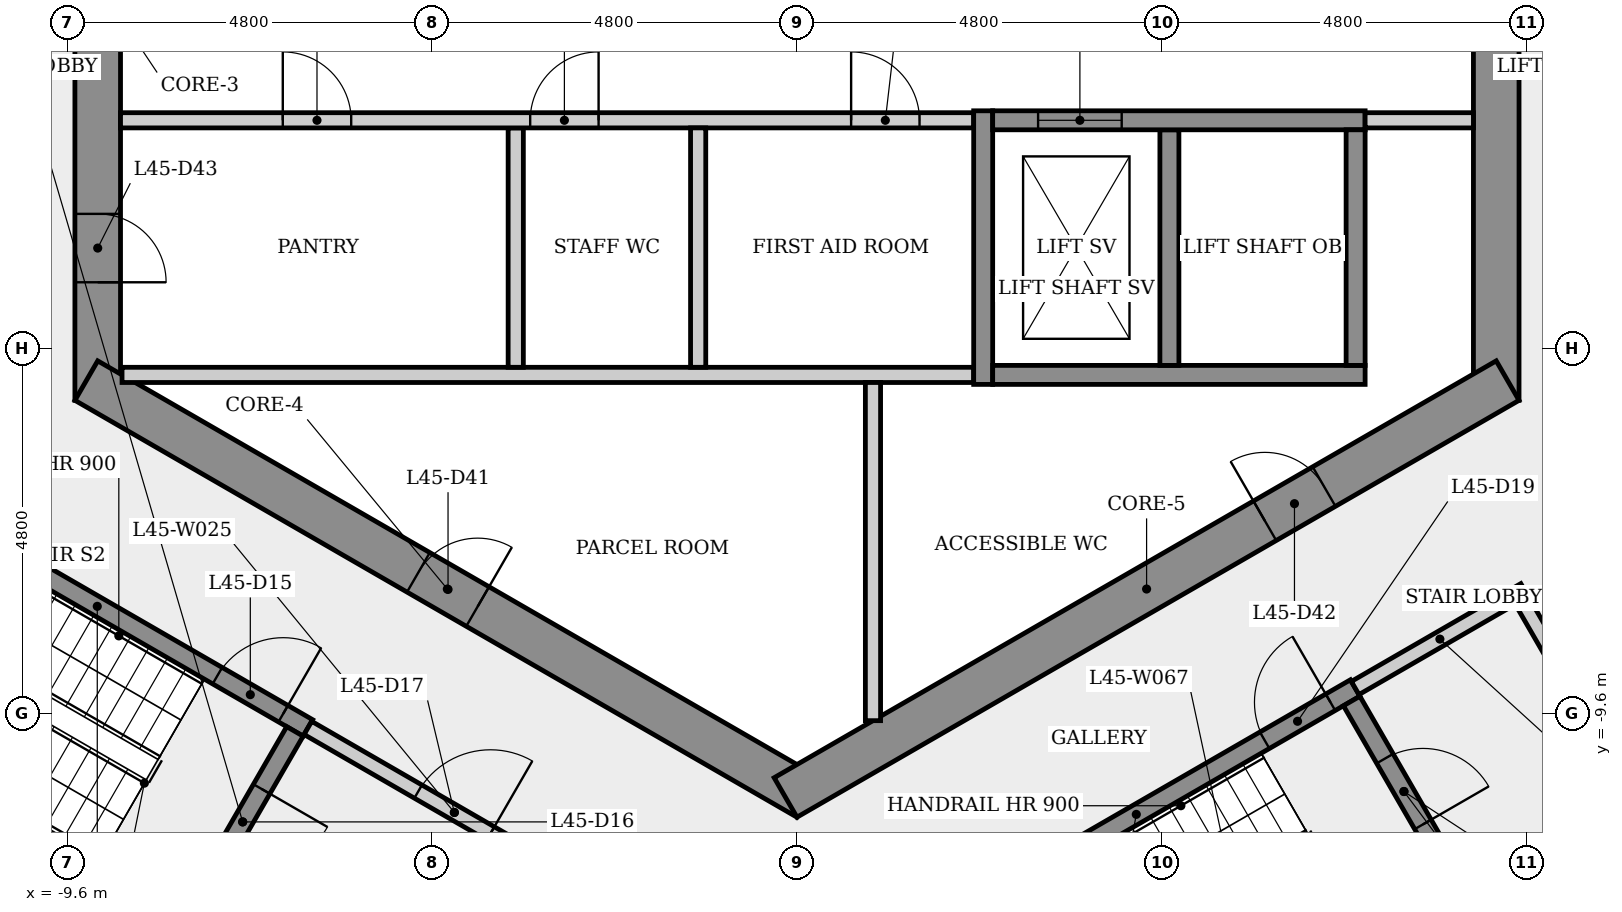
"""IFC4 building model, lengths in metres.
Left out: names, types, materials, properties, quantities, classifications, styles, units other than length and angle.
Written with IfcOpenShell. Run it as: python <this file> out.ifc"""

import sys

from ifc_helpers import new_model, si_unit, direction, frame, frame_2d, origin, place, context, subcontext, project, spatial, rectangle, extrude, element, fill, save


model = new_model("IFC4")
c1 = context("Model", 3, precision=1e-05, world=origin(), true_north=direction((0.0, 1.0)))
c2 = subcontext(c1, "Body", "Model", "MODEL_VIEW")
j1 = project(units=[si_unit("LENGTHUNIT", "METRE"), si_unit("PLANEANGLEUNIT", "RADIAN")], contexts=[c1])
p1 = place(None, origin())
s1 = spatial("IfcSite", under=j1, at=p1, CompositionType="ELEMENT")
p2 = place(p1, origin())
s2 = spatial("IfcBuilding", under=s1, at=p2, CompositionType="ELEMENT")
p3 = place(p2, frame((0.0, 0.0, 169.7)))
s3 = spatial("IfcBuildingStorey", under=s2, at=p3, CompositionType="ELEMENT", Elevation=169.7)
p4 = place(p3, frame((9.2, -5.485, 0.0), z_axis=(0.0, 0.0, 1.0), x_axis=(0.0, 1.0, 0.0)))
e1 = element("IfcWall", 1, at=p4, inside=s3, PredefinedType="SHEAR", context=c2, shape_type="SweptSolid", body=[
    extrude(rectangle(XDim=10.97, YDim=0.6, at=frame_2d((5.485, 0.0))), origin(), (0.0, 0.0, 1.0), 3.4),
])
p5 = place(p4, frame((4.685, 0.0, 0.0)))
e2 = element("IfcOpeningElement", 2, at=p5, cuts=e1, PredefinedType="OPENING", context=c2, shape_type="SweptSolid", body=[
    extrude(rectangle(XDim=1.6, YDim=2.1, at=frame_2d((0.8, 1.05))), frame((0.0, 0.31, 0.0), z_axis=(0.0, -1.0, 0.0), x_axis=(1.0, 0.0, 0.0)), (0.0, 0.0, 1.0), 0.62),
])
p6 = place(p3, frame((-9.2, 5.485, 0.0), z_axis=(0.0, 0.0, 1.0), x_axis=(0.0, -1.0, 0.0)))
e3 = element("IfcWall", 3, at=p6, inside=s3, PredefinedType="SHEAR", context=c2, shape_type="SweptSolid", body=[
    extrude(rectangle(XDim=10.97, YDim=0.6, at=frame_2d((5.485, 0.0))), origin(), (0.0, 0.0, 1.0), 3.4),
])
p7 = place(p6, frame((8.516, 0.0, 0.0)))
e4 = element("IfcOpeningElement", 4, at=p7, cuts=e3, PredefinedType="OPENING", context=c2, shape_type="SweptSolid", body=[
    extrude(rectangle(XDim=0.9, YDim=2.1, at=frame_2d((0.45, 1.05))), frame((0.0, 0.31, 0.0), z_axis=(0.0, -1.0, 0.0), x_axis=(1.0, 0.0, 0.0)), (0.0, 0.0, 1.0), 0.62),
])
p8 = place(p6, frame((4.685, 0.0, 0.0)))
e5 = element("IfcOpeningElement", 5, at=p8, cuts=e3, PredefinedType="OPENING", context=c2, shape_type="SweptSolid", body=[
    extrude(rectangle(XDim=1.6, YDim=2.1, at=frame_2d((0.8, 1.05))), frame((0.0, 0.31, 0.0), z_axis=(0.0, -1.0, 0.0), x_axis=(1.0, 0.0, 0.0)), (0.0, 0.0, 1.0), 0.62),
])
p9 = place(p3, frame((-9.35, -5.225, 0.0), z_axis=(0.0, 0.0, 1.0), x_axis=(0.866023993627, -0.500002442456, 0.0)))
e6 = element("IfcWall", 6, at=p9, inside=s3, PredefinedType="SHEAR", context=c2, shape_type="SweptSolid", body=[
    extrude(rectangle(XDim=10.97, YDim=0.6, at=frame_2d((5.485, 0.0))), origin(), (0.0, 0.0, 1.0), 3.4),
])
p10 = place(p9, frame((5.045, 0.0, 0.0)))
e7 = element("IfcOpeningElement", 7, at=p10, cuts=e6, PredefinedType="OPENING", context=c2, shape_type="SweptSolid", body=[
    extrude(rectangle(XDim=0.9, YDim=2.1, at=frame_2d((0.45, 1.05))), frame((0.0, 0.31, 0.0), z_axis=(0.0, -1.0, 0.0), x_axis=(1.0, 0.0, 0.0)), (0.0, 0.0, 1.0), 0.62),
])
p11 = place(p3, frame((-0.15, -10.71, 0.0), z_axis=(0.0, 0.0, 1.0), x_axis=(0.866023993627, 0.500002442456, 0.0)))
e8 = element("IfcWall", 8, at=p11, inside=s3, PredefinedType="SHEAR", context=c2, shape_type="SweptSolid", body=[
    extrude(rectangle(XDim=10.97, YDim=0.6, at=frame_2d((5.485, 0.0))), origin(), (0.0, 0.0, 1.0), 3.4),
])
p12 = place(p11, frame((7.281, 0.0, 0.0)))
e9 = element("IfcOpeningElement", 9, at=p12, cuts=e8, PredefinedType="OPENING", context=c2, shape_type="SweptSolid", body=[
    extrude(rectangle(XDim=0.9, YDim=2.1, at=frame_2d((0.45, 1.05))), frame((0.0, 0.31, 0.0), z_axis=(0.0, -1.0, 0.0), x_axis=(1.0, 0.0, 0.0)), (0.0, 0.0, 1.0), 0.62),
])
p13 = place(p3, frame((-11.977, -6.595, 0.0), z_axis=(0.0, 0.0, 1.0), x_axis=(0.866025499775, -0.499999833739, 0.0)))
e10 = element("IfcWall", 10, at=p13, inside=s3, PredefinedType="SHEAR", context=c2, shape_type="SweptSolid", body=[
    extrude(rectangle(XDim=6.4, YDim=0.25, at=frame_2d((3.2, 0.0))), origin(), (0.0, 0.0, 1.0), 3.05),
])
p14 = place(p13, frame((5.025, 0.0, 0.0)))
e11 = element("IfcOpeningElement", 11, at=p14, cuts=e10, PredefinedType="OPENING", context=c2, shape_type="SweptSolid", body=[
    extrude(rectangle(XDim=1.0, YDim=2.1, at=frame_2d((0.5, 1.05))), frame((0.0, 0.135, 0.0), z_axis=(0.0, -1.0, 0.0), x_axis=(1.0, 0.0, 0.0)), (0.0, 0.0, 1.0), 0.27),
])
p15 = place(p3, frame((-8.88, -5.15, 0.0), z_axis=(0.0, 0.0, 1.0), x_axis=(1.0, 0.0, 0.0)))
e12 = element("IfcWall", 12, at=p15, inside=s3, PredefinedType="PARTITIONING", context=c2, shape_type="SweptSolid", body=[
    extrude(rectangle(XDim=11.205, YDim=0.2, at=frame_2d((5.603, 0.0))), origin(), (0.0, 0.0, 1.0), 3.05),
])
p16 = place(p3, frame((-7.935, -12.393, 0.0), z_axis=(0.0, 0.0, 1.0), x_axis=(-0.866025499775, 0.499999833739, 0.0)))
e13 = element("IfcWall", 13, at=p16, inside=s3, PredefinedType="SHEAR", context=c2, shape_type="SweptSolid", body=[
    extrude(rectangle(XDim=6.4, YDim=0.25, at=frame_2d((3.2, 0.0))), origin(), (0.0, 0.0, 1.0), 3.05),
])
p17 = place(p3, frame((-6.605, -9.841, 0.0), z_axis=(0.0, 0.0, 1.0), x_axis=(-0.499996545922, -0.866027397988, 0.0)))
e14 = element("IfcWall", 14, at=p17, inside=s3, PredefinedType="SHEAR", context=c2, shape_type="SweptSolid", body=[
    extrude(rectangle(XDim=2.75, YDim=0.25, at=frame_2d((1.375, 0.0))), origin(), (0.0, 0.0, 1.0), 3.05),
])
p18 = place(p17, frame((0.875, 0.0, 0.0)))
e15 = element("IfcOpeningElement", 15, at=p18, cuts=e14, PredefinedType="OPENING", context=c2, shape_type="SweptSolid", body=[
    extrude(rectangle(XDim=1.0, YDim=2.1, at=frame_2d((0.5, 1.05))), frame((0.0, 0.135, 0.0), z_axis=(0.0, -1.0, 0.0), x_axis=(1.0, 0.0, 0.0)), (0.0, 0.0, 1.0), 0.27),
])
p19 = place(p3, frame((-6.435, -9.795, 0.0), z_axis=(0.0, 0.0, 1.0), x_axis=(0.866012907634, -0.500021643343, 0.0)))
e16 = element("IfcWall", 16, at=p19, inside=s3, PredefinedType="PARTITIONING", context=c2, shape_type="SweptSolid", body=[
    extrude(rectangle(XDim=4.45, YDim=0.2, at=frame_2d((2.225, 0.0))), origin(), (0.0, 0.0, 1.0), 3.05),
])
p20 = place(p19, frame((1.675, 0.0, 0.0)))
e17 = element("IfcOpeningElement", 17, at=p20, cuts=e16, PredefinedType="OPENING", context=c2, shape_type="SweptSolid", body=[
    extrude(rectangle(XDim=1.1, YDim=2.1, at=frame_2d((0.55, 1.05))), frame((0.0, 0.11, 0.0), z_axis=(0.0, -1.0, 0.0), x_axis=(1.0, 0.0, 0.0)), (0.0, 0.0, 1.0), 0.22),
])
p21 = place(p3, frame((-3.7, -1.9, 0.0), z_axis=(0.0, 0.0, 1.0), x_axis=(0.0, -1.0, 0.0)))
e18 = element("IfcWall", 18, at=p21, inside=s3, PredefinedType="PARTITIONING", context=c2, shape_type="SweptSolid", body=[
    extrude(rectangle(XDim=3.15, YDim=0.2, at=frame_2d((1.575, 0.0))), origin(), (0.0, 0.0, 1.0), 3.05),
])
p22 = place(p3, frame((-8.9, -1.8, 0.0), z_axis=(0.0, 0.0, 1.0), x_axis=(1.0, 0.0, 0.0)))
e19 = element("IfcWall", 19, at=p22, inside=s3, PredefinedType="PARTITIONING", context=c2, shape_type="SweptSolid", body=[
    extrude(rectangle(XDim=11.225, YDim=0.2, at=frame_2d((5.613, 0.0))), origin(), (0.0, 0.0, 1.0), 3.05),
])
p23 = place(p22, frame((2.135, 0.0, 0.0)))
e20 = element("IfcOpeningElement", 20, at=p23, cuts=e19, PredefinedType="OPENING", context=c2, shape_type="SweptSolid", body=[
    extrude(rectangle(XDim=0.9, YDim=2.1, at=frame_2d((0.45, 1.05))), frame((0.0, 0.11, 0.0), z_axis=(0.0, -1.0, 0.0), x_axis=(1.0, 0.0, 0.0)), (0.0, 0.0, 1.0), 0.22),
])
p24 = place(p22, frame((5.39, 0.0, 0.0)))
e21 = element("IfcOpeningElement", 21, at=p24, cuts=e19, PredefinedType="OPENING", context=c2, shape_type="SweptSolid", body=[
    extrude(rectangle(XDim=0.9, YDim=2.1, at=frame_2d((0.45, 1.05))), frame((0.0, 0.11, 0.0), z_axis=(0.0, -1.0, 0.0), x_axis=(1.0, 0.0, 0.0)), (0.0, 0.0, 1.0), 0.22),
])
p25 = place(p22, frame((9.613, 0.0, 0.0)))
e22 = element("IfcOpeningElement", 22, at=p25, cuts=e19, PredefinedType="OPENING", context=c2, shape_type="SweptSolid", body=[
    extrude(rectangle(XDim=0.9, YDim=2.1, at=frame_2d((0.45, 1.05))), frame((0.0, 0.11, 0.0), z_axis=(0.0, -1.0, 0.0), x_axis=(1.0, 0.0, 0.0)), (0.0, 0.0, 1.0), 0.22),
])
p26 = place(p3, frame((-1.3, -1.9, 0.0), z_axis=(0.0, 0.0, 1.0), x_axis=(0.0, -1.0, 0.0)))
e23 = element("IfcWall", 23, at=p26, inside=s3, PredefinedType="PARTITIONING", context=c2, shape_type="SweptSolid", body=[
    extrude(rectangle(XDim=3.15, YDim=0.2, at=frame_2d((1.575, 0.0))), origin(), (0.0, 0.0, 1.0), 3.05),
])
p27 = place(p3, frame((1.0, -5.25, 0.0), z_axis=(0.0, 0.0, 1.0), x_axis=(0.0, -1.0, 0.0)))
e24 = element("IfcWall", 24, at=p27, inside=s3, PredefinedType="PARTITIONING", context=c2, shape_type="SweptSolid", body=[
    extrude(rectangle(XDim=4.449, YDim=0.2, at=frame_2d((2.225, 0.0))), origin(), (0.0, 0.0, 1.0), 3.05),
])
p28 = place(p3, frame((1.585, -12.595, 0.0), z_axis=(0.0, 0.0, 1.0), x_axis=(0.866036417653, 0.499980922934, 0.0)))
e25 = element("IfcWall", 25, at=p28, inside=s3, PredefinedType="SHEAR", context=c2, shape_type="SweptSolid", body=[
    extrude(rectangle(XDim=6.65, YDim=0.25, at=frame_2d((3.325, 0.0))), origin(), (0.0, 0.0, 1.0), 3.05),
])
p29 = place(p28, frame((5.275, 0.0, 0.0)))
e26 = element("IfcOpeningElement", 26, at=p29, cuts=e25, PredefinedType="OPENING", context=c2, shape_type="SweptSolid", body=[
    extrude(rectangle(XDim=1.0, YDim=2.1, at=frame_2d((0.5, 1.05))), frame((0.0, 0.135, 0.0), z_axis=(0.0, -1.0, 0.0), x_axis=(1.0, 0.0, 0.0)), (0.0, 0.0, 1.0), 0.27),
])
p30 = place(p3, frame((2.45, -5.275, 0.0), z_axis=(0.0, 0.0, 1.0), x_axis=(0.0, 1.0, 0.0)))
e27 = element("IfcWall", 27, at=p30, inside=s3, PredefinedType="SHEAR", context=c2, shape_type="SweptSolid", body=[
    extrude(rectangle(XDim=3.6, YDim=0.25, at=frame_2d((1.8, 0.0))), origin(), (0.0, 0.0, 1.0), 3.05),
])
p31 = place(p3, frame((2.575, -5.15, 0.0), z_axis=(0.0, 0.0, 1.0), x_axis=(1.0, 0.0, 0.0)))
e28 = element("IfcWall", 28, at=p31, inside=s3, PredefinedType="SHEAR", context=c2, shape_type="SweptSolid", body=[
    extrude(rectangle(XDim=4.9, YDim=0.25, at=frame_2d((2.45, 0.0))), origin(), (0.0, 0.0, 1.0), 3.05),
])
p32 = place(p3, frame((4.9, -1.925, 0.0), z_axis=(0.0, 0.0, 1.0), x_axis=(0.0, -1.0, 0.0)))
e29 = element("IfcWall", 29, at=p32, inside=s3, PredefinedType="SHEAR", context=c2, shape_type="SweptSolid", body=[
    extrude(rectangle(XDim=3.1, YDim=0.25, at=frame_2d((1.55, 0.0))), origin(), (0.0, 0.0, 1.0), 3.4),
])
p33 = place(p3, frame((2.575, -1.8, 0.0), z_axis=(0.0, 0.0, 1.0), x_axis=(1.0, 0.0, 0.0)))
e30 = element("IfcWall", 30, at=p33, inside=s3, PredefinedType="SHEAR", context=c2, shape_type="SweptSolid", body=[
    extrude(rectangle(XDim=4.9, YDim=0.25, at=frame_2d((2.45, 0.0))), origin(), (0.0, 0.0, 1.0), 3.05),
])
p34 = place(p33, frame((0.597, 0.0, 0.0)))
e31 = element("IfcOpeningElement", 31, at=p34, cuts=e30, PredefinedType="OPENING", context=c2, shape_type="SweptSolid", body=[
    extrude(rectangle(XDim=1.1, YDim=2.1, at=frame_2d((0.55, 1.05))), frame((0.0, 0.135, 0.0), z_axis=(0.0, -1.0, 0.0), x_axis=(1.0, 0.0, 0.0)), (0.0, 0.0, 1.0), 0.27),
])
p35 = place(p3, frame((7.298, -9.441, 0.0), z_axis=(0.0, 0.0, 1.0), x_axis=(0.500034990121, -0.866005201286, 0.0)))
e32 = element("IfcWall", 32, at=p35, inside=s3, PredefinedType="SHEAR", context=c2, shape_type="SweptSolid", body=[
    extrude(rectangle(XDim=2.75, YDim=0.25, at=frame_2d((1.375, 0.0))), origin(), (0.0, 0.0, 1.0), 3.05),
])
p36 = place(p35, frame((0.875, 0.0, 0.0)))
e33 = element("IfcOpeningElement", 33, at=p36, cuts=e32, PredefinedType="OPENING", context=c2, shape_type="SweptSolid", body=[
    extrude(rectangle(XDim=1.0, YDim=2.1, at=frame_2d((0.5, 1.05))), frame((0.0, 0.135, 0.0), z_axis=(0.0, -1.0, 0.0), x_axis=(1.0, 0.0, 0.0)), (0.0, 0.0, 1.0), 0.27),
])
p37 = place(p3, frame((7.344, -9.27, 0.0), z_axis=(0.0, 0.0, 1.0), x_axis=(0.866005588531, 0.500034319456, 0.0)))
e34 = element("IfcWall", 34, at=p37, inside=s3, PredefinedType="PARTITIONING", context=c2, shape_type="SweptSolid", body=[
    extrude(rectangle(XDim=2.575, YDim=0.2, at=frame_2d((1.288, 0.0))), origin(), (0.0, 0.0, 1.0), 3.05),
])
p38 = place(p3, frame((7.35, -1.925, 0.0), z_axis=(0.0, 0.0, 1.0), x_axis=(0.0, -1.0, 0.0)))
e35 = element("IfcWall", 35, at=p38, inside=s3, PredefinedType="SHEAR", context=c2, shape_type="SweptSolid", body=[
    extrude(rectangle(XDim=3.1, YDim=0.25, at=frame_2d((1.55, 0.0))), origin(), (0.0, 0.0, 1.0), 3.4),
])
p39 = place(p3, frame((8.9, -1.8, 0.0), z_axis=(0.0, 0.0, 1.0), x_axis=(-1.0, 0.0, 0.0)))
e36 = element("IfcWall", 36, at=p39, inside=s3, PredefinedType="PARTITIONING", context=c2, shape_type="SweptSolid", body=[
    extrude(rectangle(XDim=1.425, YDim=0.2, at=frame_2d((0.712, 0.0))), origin(), (0.0, 0.0, 1.0), 3.05),
])
p40 = place(p3, frame((9.537, -8.119, 0.0), z_axis=(0.0, 0.0, 1.0), x_axis=(0.499990139034, -0.866031096941, 0.0)))
e37 = element("IfcWall", 37, at=p40, inside=s3, PredefinedType="PARTITIONING", context=c2, shape_type="SweptSolid", body=[
    extrude(rectangle(XDim=3.0, YDim=0.2, at=frame_2d((1.5, 0.0))), origin(), (0.0, 0.0, 1.0), 3.05),
])
p41 = place(p40, frame((0.935, 0.0, 0.0)))
e38 = element("IfcOpeningElement", 38, at=p41, cuts=e37, PredefinedType="OPENING", context=c2, shape_type="SweptSolid", body=[
    extrude(rectangle(XDim=1.0, YDim=2.1, at=frame_2d((0.5, 1.05))), frame((0.0, 0.11, 0.0), z_axis=(0.0, -1.0, 0.0), x_axis=(1.0, 0.0, 0.0)), (0.0, 0.0, 1.0), 0.22),
])
p42 = place(p3, frame((10.901, -10.681, 0.0), z_axis=(0.0, 0.0, 1.0), x_axis=(-0.866007538022, -0.500030943131, 0.0)))
e39 = element("IfcWall", 39, at=p42, inside=s3, PredefinedType="PARTITIONING", context=c2, shape_type="SweptSolid", body=[
    extrude(rectangle(XDim=2.375, YDim=0.2, at=frame_2d((1.188, 0.0))), origin(), (0.0, 0.0, 1.0), 3.05),
])
p43 = place(p34, origin())
e40 = element("IfcDoor", 40, at=p43, inside=s3, OperationType="SLIDING_TO_LEFT", PredefinedType="DOOR", context=c2, shape_type="SweptSolid", body=[
    extrude(rectangle(XDim=1.1, YDim=2.1, at=frame_2d((0.55, 1.05))), frame((0.0, 0.025, 0.0), z_axis=(0.0, -1.0, 0.0), x_axis=(1.0, 0.0, 0.0)), (0.0, 0.0, 1.0), 0.05),
])
fill(e31, e40)
p44 = place(p23, origin())
e41 = element("IfcDoor", 41, at=p44, inside=s3, OperationType="SINGLE_SWING_LEFT", PredefinedType="DOOR", context=c2, shape_type="SweptSolid", body=[
    extrude(rectangle(XDim=0.9, YDim=2.1, at=frame_2d((0.45, 1.05))), frame((0.0, 0.025, 0.0), z_axis=(0.0, -1.0, 0.0), x_axis=(1.0, 0.0, 0.0)), (0.0, 0.0, 1.0), 0.05),
])
fill(e20, e41)
p45 = place(p24, origin())
e42 = element("IfcDoor", 42, at=p45, inside=s3, OperationType="SINGLE_SWING_RIGHT", PredefinedType="DOOR", context=c2, shape_type="SweptSolid", body=[
    extrude(rectangle(XDim=0.9, YDim=2.1, at=frame_2d((0.45, 1.05))), frame((0.0, 0.025, 0.0), z_axis=(0.0, -1.0, 0.0), x_axis=(1.0, 0.0, 0.0)), (0.0, 0.0, 1.0), 0.05),
])
fill(e21, e42)
p46 = place(p25, origin())
e43 = element("IfcDoor", 43, at=p46, inside=s3, OperationType="SINGLE_SWING_LEFT", PredefinedType="DOOR", context=c2, shape_type="SweptSolid", body=[
    extrude(rectangle(XDim=0.9, YDim=2.1, at=frame_2d((0.45, 1.05))), frame((0.0, 0.025, 0.0), z_axis=(0.0, -1.0, 0.0), x_axis=(1.0, 0.0, 0.0)), (0.0, 0.0, 1.0), 0.05),
])
fill(e22, e43)
p47 = place(p14, origin())
e44 = element("IfcDoor", 44, at=p47, inside=s3, OperationType="SINGLE_SWING_RIGHT", PredefinedType="DOOR", context=c2, shape_type="SweptSolid", body=[
    extrude(rectangle(XDim=1.0, YDim=2.1, at=frame_2d((0.5, 1.05))), frame((0.0, 0.025, 0.0), z_axis=(0.0, -1.0, 0.0), x_axis=(1.0, 0.0, 0.0)), (0.0, 0.0, 1.0), 0.05),
])
fill(e11, e44)
p48 = place(p18, origin())
e45 = element("IfcDoor", 45, at=p48, inside=s3, OperationType="SINGLE_SWING_LEFT", PredefinedType="DOOR", context=c2, shape_type="SweptSolid", body=[
    extrude(rectangle(XDim=1.0, YDim=2.1, at=frame_2d((0.5, 1.05))), frame((0.0, 0.025, 0.0), z_axis=(0.0, -1.0, 0.0), x_axis=(1.0, 0.0, 0.0)), (0.0, 0.0, 1.0), 0.05),
])
fill(e15, e45)
p49 = place(p20, origin())
e46 = element("IfcDoor", 46, at=p49, inside=s3, OperationType="SINGLE_SWING_RIGHT", PredefinedType="DOOR", context=c2, shape_type="SweptSolid", body=[
    extrude(rectangle(XDim=1.1, YDim=2.1, at=frame_2d((0.55, 1.05))), frame((0.0, 0.025, 0.0), z_axis=(0.0, -1.0, 0.0), x_axis=(1.0, 0.0, 0.0)), (0.0, 0.0, 1.0), 0.05),
])
fill(e17, e46)
p50 = place(p29, origin())
e47 = element("IfcDoor", 47, at=p50, inside=s3, OperationType="SINGLE_SWING_RIGHT", PredefinedType="DOOR", context=c2, shape_type="SweptSolid", body=[
    extrude(rectangle(XDim=1.0, YDim=2.1, at=frame_2d((0.5, 1.05))), frame((0.0, 0.025, 0.0), z_axis=(0.0, -1.0, 0.0), x_axis=(1.0, 0.0, 0.0)), (0.0, 0.0, 1.0), 0.05),
])
fill(e26, e47)
p51 = place(p36, origin())
e48 = element("IfcDoor", 48, at=p51, inside=s3, OperationType="SINGLE_SWING_RIGHT", PredefinedType="DOOR", context=c2, shape_type="SweptSolid", body=[
    extrude(rectangle(XDim=1.0, YDim=2.1, at=frame_2d((0.5, 1.05))), frame((0.0, 0.025, 0.0), z_axis=(0.0, -1.0, 0.0), x_axis=(1.0, 0.0, 0.0)), (0.0, 0.0, 1.0), 0.05),
])
fill(e33, e48)
p52 = place(p10, origin())
e49 = element("IfcDoor", 49, at=p52, inside=s3, OperationType="SINGLE_SWING_RIGHT", PredefinedType="DOOR", context=c2, shape_type="SweptSolid", body=[
    extrude(rectangle(XDim=0.9, YDim=2.1, at=frame_2d((0.45, 1.05))), frame((0.0, 0.025, 0.0), z_axis=(0.0, -1.0, 0.0), x_axis=(1.0, 0.0, 0.0)), (0.0, 0.0, 1.0), 0.05),
])
fill(e7, e49)
p53 = place(p12, origin())
e50 = element("IfcDoor", 50, at=p53, inside=s3, OperationType="SINGLE_SWING_LEFT", PredefinedType="DOOR", context=c2, shape_type="SweptSolid", body=[
    extrude(rectangle(XDim=0.9, YDim=2.1, at=frame_2d((0.45, 1.05))), frame((0.0, 0.025, 0.0), z_axis=(0.0, -1.0, 0.0), x_axis=(1.0, 0.0, 0.0)), (0.0, 0.0, 1.0), 0.05),
])
fill(e9, e50)
p54 = place(p7, origin())
e51 = element("IfcDoor", 51, at=p54, inside=s3, OperationType="SINGLE_SWING_RIGHT", PredefinedType="DOOR", context=c2, shape_type="SweptSolid", body=[
    extrude(rectangle(XDim=0.9, YDim=2.1, at=frame_2d((0.45, 1.05))), frame((0.0, 0.025, 0.0), z_axis=(0.0, -1.0, 0.0), x_axis=(1.0, 0.0, 0.0)), (0.0, 0.0, 1.0), 0.05),
])
fill(e4, e51)
save(model, sys.argv[1])
